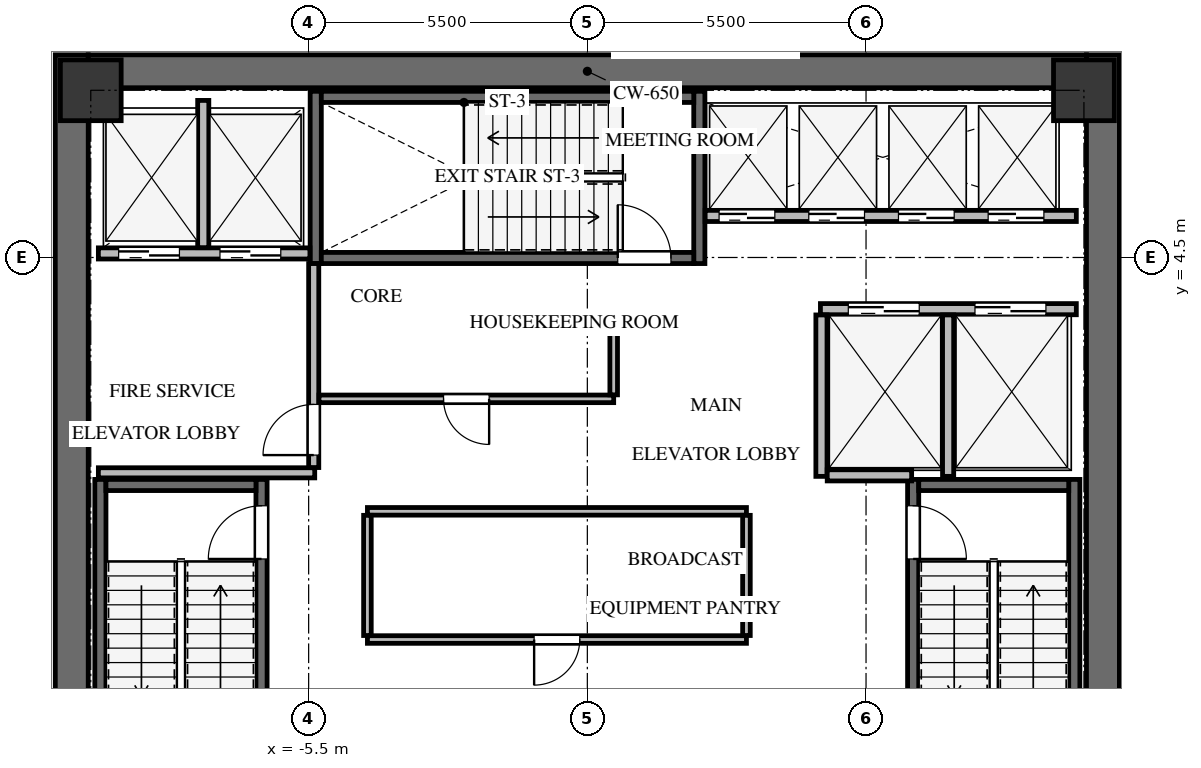
"""IFC4 building model, lengths in metres.
Left out: names, types, materials, properties, quantities, classifications, styles, units other than length and angle.
Written with IfcOpenShell. Run it as: python <this file> out.ifc"""

import sys

from ifc_helpers import new_model, si_unit, direction, frame, frame_2d, origin, origin_2d, place, context, subcontext, project, spatial, rectangle, extrude, source, transform, mapped, element, fill, save


model = new_model("IFC4")
c1 = context("Model", 3, precision=1e-05, world=origin(), true_north=direction((0.0, 1.0)))
c2 = subcontext(c1, "Body", "Model", "MODEL_VIEW")
j1 = project(units=[si_unit("LENGTHUNIT", "METRE"), si_unit("PLANEANGLEUNIT", "RADIAN")], contexts=[c1])
p1 = place(None, origin())
s1 = spatial("IfcSite", under=j1, at=p1, CompositionType="ELEMENT")
p2 = place(p1, origin())
s2 = spatial("IfcBuilding", under=s1, at=p2, CompositionType="ELEMENT")
p3 = place(p2, frame((0.0, 0.0, 209.2)))
s3 = spatial("IfcBuildingStorey", under=s2, at=p3, CompositionType="ELEMENT", Elevation=209.2)
for number, where, z_axis, x_axis in (
    (1, (-10.175, -8.5, 0.0), (0.0, 0.0, 1.0), (0.0, 1.0, 0.0)),
    (2, (10.175, -8.5, 0.0), (0.0, 0.0, 1.0), (0.0, 1.0, 0.0)),
):
    element("IfcWall", number, at=place(p3, frame(where, z_axis=z_axis, x_axis=x_axis)), inside=s3, PredefinedType="SHEAR", context=c2, shape_type="SweptSolid", body=[
        extrude(rectangle(XDim=17.0, YDim=0.65, at=frame_2d((8.5, 0.0))), origin(), (0.0, 0.0, 1.0), 4.2),
    ])
p4 = place(p3, frame((-9.85, 8.175, 0.0), z_axis=(0.0, 0.0, 1.0), x_axis=(1.0, 0.0, 0.0)))
e3 = element("IfcWall", 3, at=p4, inside=s3, PredefinedType="SHEAR", context=c2, shape_type="SweptSolid", body=[
    extrude(rectangle(XDim=19.7, YDim=0.65, at=frame_2d((9.85, 0.0))), origin(), (0.0, 0.0, 1.0), 4.2),
])
p5 = place(p3, frame((-6.43, -7.77, -0.24), z_axis=(0.0, 0.0, 1.0), x_axis=(0.0, 1.0, 0.0)))
e4 = element("IfcWall", 4, at=p5, inside=s3, PredefinedType="SHEAR", context=c2, shape_type="SweptSolid", body=[
    extrude(rectangle(XDim=7.89, YDim=0.22, at=frame_2d((3.945, 0.0))), origin(), (0.0, 0.0, 1.0), 4.14),
])
p6 = place(p5, frame((6.32, 0.0, 0.0)))
e5 = element("IfcOpeningElement", 5, at=p6, cuts=e4, PredefinedType="OPENING", context=c2, shape_type="SweptSolid", body=[
    extrude(rectangle(XDim=1.05, YDim=2.15, at=frame_2d((0.525, 1.075))), frame((0.0, 0.12, 0.0), z_axis=(0.0, -1.0, 0.0), x_axis=(1.0, 0.0, 0.0)), (0.0, 0.0, 1.0), 0.24),
])
p7 = place(p3, frame((-9.61, 0.12, -0.24), z_axis=(0.0, 0.0, 1.0), x_axis=(0.0, -1.0, 0.0)))
e6 = element("IfcWall", 6, at=p7, inside=s3, PredefinedType="SHEAR", context=c2, shape_type="SweptSolid", body=[
    extrude(rectangle(XDim=7.89, YDim=0.22, at=frame_2d((3.945, 0.0))), origin(), (0.0, 0.0, 1.0), 4.14),
])
p8 = place(p3, frame((-6.54, 0.01, -0.24), z_axis=(0.0, 0.0, 1.0), x_axis=(-1.0, 0.0, 0.0)))
e7 = element("IfcWall", 7, at=p8, inside=s3, PredefinedType="SHEAR", context=c2, shape_type="SweptSolid", body=[
    extrude(rectangle(XDim=2.96, YDim=0.22, at=frame_2d((1.48, 0.0))), origin(), (0.0, 0.0, 1.0), 4.14),
])
p9 = place(p3, frame((9.61, -7.77, -0.24), z_axis=(0.0, 0.0, 1.0), x_axis=(0.0, 1.0, 0.0)))
e8 = element("IfcWall", 8, at=p9, inside=s3, PredefinedType="SHEAR", context=c2, shape_type="SweptSolid", body=[
    extrude(rectangle(XDim=7.89, YDim=0.22, at=frame_2d((3.945, 0.0))), origin(), (0.0, 0.0, 1.0), 4.14),
])
p10 = place(p3, frame((6.43, 0.12, -0.24), z_axis=(0.0, 0.0, 1.0), x_axis=(0.0, -1.0, 0.0)))
e9 = element("IfcWall", 9, at=p10, inside=s3, PredefinedType="SHEAR", context=c2, shape_type="SweptSolid", body=[
    extrude(rectangle(XDim=7.89, YDim=0.22, at=frame_2d((3.945, 0.0))), origin(), (0.0, 0.0, 1.0), 4.14),
])
p11 = place(p10, frame((0.52, 0.0, 0.0)))
e10 = element("IfcOpeningElement", 10, at=p11, cuts=e9, PredefinedType="OPENING", context=c2, shape_type="SweptSolid", body=[
    extrude(rectangle(XDim=1.05, YDim=2.15, at=frame_2d((0.525, 1.075))), frame((0.0, 0.12, 0.0), z_axis=(0.0, -1.0, 0.0), x_axis=(1.0, 0.0, 0.0)), (0.0, 0.0, 1.0), 0.24),
])
p12 = place(p3, frame((9.5, 0.01, -0.24), z_axis=(0.0, 0.0, 1.0), x_axis=(-1.0, 0.0, 0.0)))
e11 = element("IfcWall", 11, at=p12, inside=s3, PredefinedType="SHEAR", context=c2, shape_type="SweptSolid", body=[
    extrude(rectangle(XDim=2.96, YDim=0.22, at=frame_2d((1.48, 0.0))), origin(), (0.0, 0.0, 1.0), 4.14),
])
for number, where, z_axis, x_axis in (
    (12, (2.21, 4.38, -0.24), (0.0, 0.0, 1.0), (0.0, 1.0, 0.0)),
    (13, (-5.36, 7.78, -0.24), (0.0, 0.0, 1.0), (0.0, -1.0, 0.0)),
):
    element("IfcWall", number, at=place(p3, frame(where, z_axis=z_axis, x_axis=x_axis)), inside=s3, PredefinedType="SHEAR", context=c2, shape_type="SweptSolid", body=[
        extrude(rectangle(XDim=3.4, YDim=0.22, at=frame_2d((1.7, 0.0))), origin(), (0.0, 0.0, 1.0), 4.14),
    ])
p13 = place(p3, frame((-5.25, 4.49, -0.24), z_axis=(0.0, 0.0, 1.0), x_axis=(1.0, 0.0, 0.0)))
e14 = element("IfcWall", 14, at=p13, inside=s3, PredefinedType="SHEAR", context=c2, shape_type="SweptSolid", body=[
    extrude(rectangle(XDim=7.35, YDim=0.22, at=frame_2d((3.675, 0.0))), origin(), (0.0, 0.0, 1.0), 4.14),
])
p14 = place(p13, frame((5.85, 0.0, 0.0)))
e15 = element("IfcOpeningElement", 15, at=p14, cuts=e14, PredefinedType="OPENING", context=c2, shape_type="SweptSolid", body=[
    extrude(rectangle(XDim=1.05, YDim=2.15, at=frame_2d((0.525, 1.075))), frame((0.0, 0.12, 0.0), z_axis=(0.0, -1.0, 0.0), x_axis=(1.0, 0.0, 0.0)), (0.0, 0.0, 1.0), 0.24),
])
p15 = place(p3, frame((2.1, 7.67, -0.24), z_axis=(0.0, 0.0, 1.0), x_axis=(-1.0, 0.0, 0.0)))
e16 = element("IfcWall", 16, at=p15, inside=s3, PredefinedType="SHEAR", context=c2, shape_type="SweptSolid", body=[
    extrude(rectangle(XDim=7.35, YDim=0.22, at=frame_2d((3.675, 0.0))), origin(), (0.0, 0.0, 1.0), 4.14),
])
m1 = source(origin(), c2, "Body", "SweptSolid", [
    extrude(rectangle(XDim=1.2, YDim=1.2, at=origin_2d()), origin(), (0.0, 0.0, 1.0), 4.14),
])
for number, where, z_axis, x_axis in (
    (17, (9.8, 7.8, -0.24), (0.0, 0.0, 1.0), (1.0, 0.0, 0.0)),
    (18, (-9.8, 7.8, -0.24), (0.0, 0.0, 1.0), (1.0, 0.0, 0.0)),
):
    element("IfcColumn", number, at=place(p3, frame(where, z_axis=z_axis, x_axis=x_axis)), inside=s3, PredefinedType="COLUMN", context=c2, shape_type="MappedRepresentation", body=[
        mapped(m1, transform((0.0, 0.0, 0.0), x_axis=(1.0, 0.0, 0.0), y_axis=(0.0, 1.0, 0.0), z_axis=(0.0, 0.0, 1.0), scale=1.0)),
    ])
p16 = place(p3, frame((-9.65, 4.58, 0.0), z_axis=(0.0, 0.0, 1.0), x_axis=(1.0, 0.0, 0.0)))
e19 = element("IfcWall", 19, at=p16, inside=s3, PredefinedType="SOLIDWALL", context=c2, shape_type="SweptSolid", body=[
    extrude(rectangle(XDim=4.175, YDim=0.22, at=frame_2d((2.087, 0.0))), origin(), (0.0, 0.0, 1.0), 3.885),
])
p17 = place(p16, frame((0.4, 0.0, 0.0)))
e20 = element("IfcOpeningElement", 20, at=p17, cuts=e19, PredefinedType="OPENING", context=c2, shape_type="SweptSolid", body=[
    extrude(rectangle(XDim=1.2, YDim=2.15, at=frame_2d((0.6, 1.075))), frame((0.0, 0.12, 0.0), z_axis=(0.0, -1.0, 0.0), x_axis=(1.0, 0.0, 0.0)), (0.0, 0.0, 1.0), 0.24),
])
p18 = place(p16, frame((2.4, 0.0, 0.0)))
e21 = element("IfcOpeningElement", 21, at=p18, cuts=e19, PredefinedType="OPENING", context=c2, shape_type="SweptSolid", body=[
    extrude(rectangle(XDim=1.2, YDim=2.15, at=frame_2d((0.6, 1.075))), frame((0.0, 0.12, 0.0), z_axis=(0.0, -1.0, 0.0), x_axis=(1.0, 0.0, 0.0)), (0.0, 0.0, 1.0), 0.24),
])
p19 = place(p3, frame((-7.58, 4.694, 0.0), z_axis=(0.0, 0.0, 1.0), x_axis=(0.0, 1.0, 0.0)))
e22 = element("IfcWall", 22, at=p19, inside=s3, PredefinedType="SOLIDWALL", context=c2, shape_type="SweptSolid", body=[
    extrude(rectangle(XDim=2.906, YDim=0.22, at=frame_2d((1.453, 0.0))), origin(), (0.0, 0.0, 1.0), 3.885),
])
p20 = place(p3, frame((-9.65, 0.25, 0.0), z_axis=(0.0, 0.0, 1.0), x_axis=(1.0, 0.0, 0.0)))
e23 = element("IfcWall", 23, at=p20, inside=s3, PredefinedType="SOLIDWALL", context=c2, shape_type="SweptSolid", body=[
    extrude(rectangle(XDim=4.27, YDim=0.2, at=frame_2d((2.135, 0.0))), origin(), (0.0, 0.0, 1.0), 3.885),
])
p21 = place(p3, frame((-5.4, 0.354, 0.0), z_axis=(0.0, 0.0, 1.0), x_axis=(0.0, 1.0, 0.0)))
e24 = element("IfcWall", 24, at=p21, inside=s3, PredefinedType="SOLIDWALL", context=c2, shape_type="SweptSolid", body=[
    extrude(rectangle(XDim=4.026, YDim=0.2, at=frame_2d((2.013, 0.0))), origin(), (0.0, 0.0, 1.0), 3.885),
])
p22 = place(p21, frame((0.246, 0.0, 0.0)))
e25 = element("IfcOpeningElement", 25, at=p22, cuts=e24, PredefinedType="OPENING", context=c2, shape_type="SweptSolid", body=[
    extrude(rectangle(XDim=1.0, YDim=2.15, at=frame_2d((0.5, 1.075))), frame((0.0, 0.11, 0.0), z_axis=(0.0, -1.0, 0.0), x_axis=(1.0, 0.0, 0.0)), (0.0, 0.0, 1.0), 0.22),
])
p23 = place(p3, frame((4.6, 3.48, 0.0), z_axis=(0.0, 0.0, 1.0), x_axis=(1.0, 0.0, 0.0)))
e26 = element("IfcWall", 26, at=p23, inside=s3, PredefinedType="SOLIDWALL", context=c2, shape_type="SweptSolid", body=[
    extrude(rectangle(XDim=5.05, YDim=0.22, at=frame_2d((2.525, 0.0))), origin(), (0.0, 0.0, 1.0), 3.885),
])
p24 = place(p23, frame((0.55, 0.0, 0.0)))
e27 = element("IfcOpeningElement", 27, at=p24, cuts=e26, PredefinedType="OPENING", context=c2, shape_type="SweptSolid", body=[
    extrude(rectangle(XDim=1.4, YDim=2.15, at=frame_2d((0.7, 1.075))), frame((0.0, 0.12, 0.0), z_axis=(0.0, -1.0, 0.0), x_axis=(1.0, 0.0, 0.0)), (0.0, 0.0, 1.0), 0.24),
])
p25 = place(p23, frame((3.05, 0.0, 0.0)))
e28 = element("IfcOpeningElement", 28, at=p25, cuts=e26, PredefinedType="OPENING", context=c2, shape_type="SweptSolid", body=[
    extrude(rectangle(XDim=1.4, YDim=2.15, at=frame_2d((0.7, 1.075))), frame((0.0, 0.12, 0.0), z_axis=(0.0, -1.0, 0.0), x_axis=(1.0, 0.0, 0.0)), (0.0, 0.0, 1.0), 0.24),
])
for number, where, z_axis, x_axis in (
    (29, (4.62, 0.18, 0.0), (0.0, 0.0, 1.0), (0.0, 1.0, 0.0)),
    (30, (7.12, 0.18, 0.0), (0.0, 0.0, 1.0), (0.0, 1.0, 0.0)),
):
    element("IfcWall", number, at=place(p3, frame(where, z_axis=z_axis, x_axis=x_axis)), inside=s3, PredefinedType="SOLIDWALL", context=c2, shape_type="SweptSolid", body=[
        extrude(rectangle(XDim=3.186, YDim=0.22, at=frame_2d((1.593, 0.0))), origin(), (0.0, 0.0, 1.0), 3.885),
    ])
p26 = place(p3, frame((4.734, 0.2, 0.0), z_axis=(0.0, 0.0, 1.0), x_axis=(1.0, 0.0, 0.0)))
e31 = element("IfcWall", 31, at=p26, inside=s3, PredefinedType="SOLIDWALL", context=c2, shape_type="SweptSolid", body=[
    extrude(rectangle(XDim=1.666, YDim=0.22, at=frame_2d((0.833, 0.0))), origin(), (0.0, 0.0, 1.0), 3.885),
])
p27 = place(p3, frame((2.325, 5.32, 0.0), z_axis=(0.0, 0.0, 1.0), x_axis=(1.0, 0.0, 0.0)))
e32 = element("IfcWall", 32, at=p27, inside=s3, PredefinedType="SOLIDWALL", context=c2, shape_type="SweptSolid", body=[
    extrude(rectangle(XDim=7.325, YDim=0.22, at=frame_2d((3.663, 0.0))), origin(), (0.0, 0.0, 1.0), 3.885),
])
p28 = place(p27, frame((0.275, 0.0, 0.0)))
e33 = element("IfcOpeningElement", 33, at=p28, cuts=e32, PredefinedType="OPENING", context=c2, shape_type="SweptSolid", body=[
    extrude(rectangle(XDim=1.1, YDim=2.15, at=frame_2d((0.55, 1.075))), frame((0.0, 0.12, 0.0), z_axis=(0.0, -1.0, 0.0), x_axis=(1.0, 0.0, 0.0)), (0.0, 0.0, 1.0), 0.24),
])
p29 = place(p27, frame((2.045, 0.0, 0.0)))
e34 = element("IfcOpeningElement", 34, at=p29, cuts=e32, PredefinedType="OPENING", context=c2, shape_type="SweptSolid", body=[
    extrude(rectangle(XDim=1.1, YDim=2.15, at=frame_2d((0.55, 1.075))), frame((0.0, 0.12, 0.0), z_axis=(0.0, -1.0, 0.0), x_axis=(1.0, 0.0, 0.0)), (0.0, 0.0, 1.0), 0.24),
])
p30 = place(p27, frame((3.815, 0.0, 0.0)))
e35 = element("IfcOpeningElement", 35, at=p30, cuts=e32, PredefinedType="OPENING", context=c2, shape_type="SweptSolid", body=[
    extrude(rectangle(XDim=1.1, YDim=2.15, at=frame_2d((0.55, 1.075))), frame((0.0, 0.12, 0.0), z_axis=(0.0, -1.0, 0.0), x_axis=(1.0, 0.0, 0.0)), (0.0, 0.0, 1.0), 0.24),
])
p31 = place(p27, frame((5.585, 0.0, 0.0)))
e36 = element("IfcOpeningElement", 36, at=p31, cuts=e32, PredefinedType="OPENING", context=c2, shape_type="SweptSolid", body=[
    extrude(rectangle(XDim=1.1, YDim=2.15, at=frame_2d((0.55, 1.075))), frame((0.0, 0.12, 0.0), z_axis=(0.0, -1.0, 0.0), x_axis=(1.0, 0.0, 0.0)), (0.0, 0.0, 1.0), 0.24),
])
p32 = place(p3, frame((3.14, -3.04, 0.0), z_axis=(0.0, 0.0, 1.0), x_axis=(-1.0, 0.0, 0.0)))
e37 = element("IfcWall", 37, at=p32, inside=s3, PredefinedType="PARTITIONING", context=c2, shape_type="SweptSolid", body=[
    extrude(rectangle(XDim=7.48, YDim=0.15, at=frame_2d((3.74, 0.0))), origin(), (0.0, 0.0, 1.0), 3.885),
])
p33 = place(p32, frame((3.29, 0.0, 0.0)))
e38 = element("IfcOpeningElement", 38, at=p33, cuts=e37, PredefinedType="OPENING", context=c2, shape_type="SweptSolid", body=[
    extrude(rectangle(XDim=0.9, YDim=2.05, at=frame_2d((0.45, 1.025))), frame((0.0, 0.085, 0.0), z_axis=(0.0, -1.0, 0.0), x_axis=(1.0, 0.0, 0.0)), (0.0, 0.0, 1.0), 0.17),
])
p34 = place(p3, frame((-4.34, -0.51, 0.0), z_axis=(0.0, 0.0, 1.0), x_axis=(1.0, 0.0, 0.0)))
e39 = element("IfcWall", 39, at=p34, inside=s3, PredefinedType="PARTITIONING", context=c2, shape_type="SweptSolid", body=[
    extrude(rectangle(XDim=7.48, YDim=0.15, at=frame_2d((3.74, 0.0))), origin(), (0.0, 0.0, 1.0), 3.885),
])
for number, where, z_axis, x_axis in (
    (40, (-4.34, -2.961, 0.0), (0.0, 0.0, 1.0), (0.0, 1.0, 0.0)),
    (41, (3.14, -0.589, 0.0), (0.0, 0.0, 1.0), (0.0, -1.0, 0.0)),
):
    element("IfcWall", number, at=place(p3, frame(where, z_axis=z_axis, x_axis=x_axis)), inside=s3, PredefinedType="PARTITIONING", context=c2, shape_type="SweptSolid", body=[
        extrude(rectangle(XDim=2.372, YDim=0.15, at=frame_2d((1.186, 0.0))), origin(), (0.0, 0.0, 1.0), 3.885),
    ])
p35 = place(p3, frame((0.52, 1.71, 0.0), z_axis=(0.0, 0.0, 1.0), x_axis=(-1.0, 0.0, 0.0)))
e42 = element("IfcWall", 42, at=p35, inside=s3, PredefinedType="PARTITIONING", context=c2, shape_type="SweptSolid", body=[
    extrude(rectangle(XDim=5.816, YDim=0.15, at=frame_2d((2.908, 0.0))), origin(), (0.0, 0.0, 1.0), 3.885),
])
p36 = place(p35, frame((2.458, 0.0, 0.0)))
e43 = element("IfcOpeningElement", 43, at=p36, cuts=e42, PredefinedType="OPENING", context=c2, shape_type="SweptSolid", body=[
    extrude(rectangle(XDim=0.9, YDim=2.05, at=frame_2d((0.45, 1.025))), frame((0.0, 0.085, 0.0), z_axis=(0.0, -1.0, 0.0), x_axis=(1.0, 0.0, 0.0)), (0.0, 0.0, 1.0), 0.17),
])
p37 = place(p3, frame((0.52, 3.3, 0.0), z_axis=(0.0, 0.0, 1.0), x_axis=(0.0, -1.0, 0.0)))
e44 = element("IfcWall", 44, at=p37, inside=s3, PredefinedType="PARTITIONING", context=c2, shape_type="SweptSolid", body=[
    extrude(rectangle(XDim=1.511, YDim=0.15, at=frame_2d((0.755, 0.0))), origin(), (0.0, 0.0, 1.0), 3.885),
])
m2 = source(origin(), c2, "Body", "SweptSolid", [
    extrude(rectangle(XDim=1.05, YDim=2.15, at=frame_2d((0.525, 1.075))), frame((0.0, 0.025, 0.0), z_axis=(0.0, -1.0, 0.0), x_axis=(1.0, 0.0, 0.0)), (0.0, 0.0, 1.0), 0.05),
])
p38 = place(p6, origin())
e45 = element("IfcDoor", 45, at=p38, inside=s3, OperationType="SINGLE_SWING_LEFT", PredefinedType="DOOR", context=c2, shape_type="MappedRepresentation", body=[
    mapped(m2, transform((0.0, 0.0, 0.0), x_axis=(1.0, 0.0, 0.0), y_axis=(0.0, 1.0, 0.0), z_axis=(0.0, 0.0, 1.0), scale=1.0)),
])
fill(e5, e45)
m3 = source(origin(), c2, "Body", "SweptSolid", [
    extrude(rectangle(XDim=1.05, YDim=2.15, at=frame_2d((0.525, 1.075))), frame((0.0, 0.025, 0.0), z_axis=(0.0, -1.0, 0.0), x_axis=(1.0, 0.0, 0.0)), (0.0, 0.0, 1.0), 0.05),
])
p39 = place(p11, origin())
e46 = element("IfcDoor", 46, at=p39, inside=s3, OperationType="SINGLE_SWING_RIGHT", PredefinedType="DOOR", context=c2, shape_type="MappedRepresentation", body=[
    mapped(m3, transform((0.0, 0.0, 0.0), x_axis=(1.0, 0.0, 0.0), y_axis=(0.0, 1.0, 0.0), z_axis=(0.0, 0.0, 1.0), scale=1.0)),
])
fill(e10, e46)
p40 = place(p14, origin())
e47 = element("IfcDoor", 47, at=p40, inside=s3, OperationType="SINGLE_SWING_LEFT", PredefinedType="DOOR", context=c2, shape_type="MappedRepresentation", body=[
    mapped(m2, transform((0.0, 0.0, 0.0), x_axis=(1.0, 0.0, 0.0), y_axis=(0.0, 1.0, 0.0), z_axis=(0.0, 0.0, 1.0), scale=1.0)),
])
fill(e15, e47)
m4 = source(origin(), c2, "Body", "SweptSolid", [
    extrude(rectangle(XDim=1.2, YDim=2.15, at=frame_2d((0.6, 1.075))), frame((0.0, 0.025, 0.0), z_axis=(0.0, -1.0, 0.0), x_axis=(1.0, 0.0, 0.0)), (0.0, 0.0, 1.0), 0.05),
])
p41 = place(p17, origin())
e48 = element("IfcDoor", 48, at=p41, inside=s3, OperationType="DOUBLE_DOOR_SLIDING", PredefinedType="DOOR", context=c2, shape_type="MappedRepresentation", body=[
    mapped(m4, transform((0.0, 0.0, 0.0), x_axis=(1.0, 0.0, 0.0), y_axis=(0.0, 1.0, 0.0), z_axis=(0.0, 0.0, 1.0), scale=1.0)),
])
fill(e20, e48)
p42 = place(p18, origin())
e49 = element("IfcDoor", 49, at=p42, inside=s3, OperationType="DOUBLE_DOOR_SLIDING", PredefinedType="DOOR", context=c2, shape_type="MappedRepresentation", body=[
    mapped(m4, transform((0.0, 0.0, 0.0), x_axis=(1.0, 0.0, 0.0), y_axis=(0.0, 1.0, 0.0), z_axis=(0.0, 0.0, 1.0), scale=1.0)),
])
fill(e21, e49)
m5 = source(origin(), c2, "Body", "SweptSolid", [
    extrude(rectangle(XDim=1.0, YDim=2.15, at=frame_2d((0.5, 1.075))), frame((0.0, 0.025, 0.0), z_axis=(0.0, -1.0, 0.0), x_axis=(1.0, 0.0, 0.0)), (0.0, 0.0, 1.0), 0.05),
])
p43 = place(p22, origin())
e50 = element("IfcDoor", 50, at=p43, inside=s3, OperationType="SINGLE_SWING_LEFT", PredefinedType="DOOR", context=c2, shape_type="MappedRepresentation", body=[
    mapped(m5, transform((0.0, 0.0, 0.0), x_axis=(1.0, 0.0, 0.0), y_axis=(0.0, 1.0, 0.0), z_axis=(0.0, 0.0, 1.0), scale=1.0)),
])
fill(e25, e50)
m6 = source(origin(), c2, "Body", "SweptSolid", [
    extrude(rectangle(XDim=1.4, YDim=2.15, at=frame_2d((0.7, 1.075))), frame((0.0, 0.025, 0.0), z_axis=(0.0, -1.0, 0.0), x_axis=(1.0, 0.0, 0.0)), (0.0, 0.0, 1.0), 0.05),
])
p44 = place(p24, origin())
e51 = element("IfcDoor", 51, at=p44, inside=s3, OperationType="DOUBLE_DOOR_SLIDING", PredefinedType="DOOR", context=c2, shape_type="MappedRepresentation", body=[
    mapped(m6, transform((0.0, 0.0, 0.0), x_axis=(1.0, 0.0, 0.0), y_axis=(0.0, 1.0, 0.0), z_axis=(0.0, 0.0, 1.0), scale=1.0)),
])
fill(e27, e51)
p45 = place(p25, origin())
e52 = element("IfcDoor", 52, at=p45, inside=s3, OperationType="DOUBLE_DOOR_SLIDING", PredefinedType="DOOR", context=c2, shape_type="MappedRepresentation", body=[
    mapped(m6, transform((0.0, 0.0, 0.0), x_axis=(1.0, 0.0, 0.0), y_axis=(0.0, 1.0, 0.0), z_axis=(0.0, 0.0, 1.0), scale=1.0)),
])
fill(e28, e52)
m7 = source(origin(), c2, "Body", "SweptSolid", [
    extrude(rectangle(XDim=1.1, YDim=2.15, at=frame_2d((0.55, 1.075))), frame((0.0, 0.025, 0.0), z_axis=(0.0, -1.0, 0.0), x_axis=(1.0, 0.0, 0.0)), (0.0, 0.0, 1.0), 0.05),
])
p46 = place(p28, origin())
e53 = element("IfcDoor", 53, at=p46, inside=s3, OperationType="DOUBLE_DOOR_SLIDING", PredefinedType="DOOR", context=c2, shape_type="MappedRepresentation", body=[
    mapped(m7, transform((0.0, 0.0, 0.0), x_axis=(1.0, 0.0, 0.0), y_axis=(0.0, 1.0, 0.0), z_axis=(0.0, 0.0, 1.0), scale=1.0)),
])
fill(e33, e53)
p47 = place(p29, origin())
e54 = element("IfcDoor", 54, at=p47, inside=s3, OperationType="DOUBLE_DOOR_SLIDING", PredefinedType="DOOR", context=c2, shape_type="MappedRepresentation", body=[
    mapped(m7, transform((0.0, 0.0, 0.0), x_axis=(1.0, 0.0, 0.0), y_axis=(0.0, 1.0, 0.0), z_axis=(0.0, 0.0, 1.0), scale=1.0)),
])
fill(e34, e54)
p48 = place(p30, origin())
e55 = element("IfcDoor", 55, at=p48, inside=s3, OperationType="DOUBLE_DOOR_SLIDING", PredefinedType="DOOR", context=c2, shape_type="MappedRepresentation", body=[
    mapped(m7, transform((0.0, 0.0, 0.0), x_axis=(1.0, 0.0, 0.0), y_axis=(0.0, 1.0, 0.0), z_axis=(0.0, 0.0, 1.0), scale=1.0)),
])
fill(e35, e55)
p49 = place(p31, origin())
e56 = element("IfcDoor", 56, at=p49, inside=s3, OperationType="DOUBLE_DOOR_SLIDING", PredefinedType="DOOR", context=c2, shape_type="MappedRepresentation", body=[
    mapped(m7, transform((0.0, 0.0, 0.0), x_axis=(1.0, 0.0, 0.0), y_axis=(0.0, 1.0, 0.0), z_axis=(0.0, 0.0, 1.0), scale=1.0)),
])
fill(e36, e56)
m8 = source(origin(), c2, "Body", "SweptSolid", [
    extrude(rectangle(XDim=0.9, YDim=2.05, at=frame_2d((0.45, 1.025))), frame((0.0, 0.025, 0.0), z_axis=(0.0, -1.0, 0.0), x_axis=(1.0, 0.0, 0.0)), (0.0, 0.0, 1.0), 0.05),
])
p50 = place(p33, origin())
e57 = element("IfcDoor", 57, at=p50, inside=s3, OperationType="SINGLE_SWING_RIGHT", PredefinedType="DOOR", context=c2, shape_type="MappedRepresentation", body=[
    mapped(m8, transform((0.0, 0.0, 0.0), x_axis=(1.0, 0.0, 0.0), y_axis=(0.0, 1.0, 0.0), z_axis=(0.0, 0.0, 1.0), scale=1.0)),
])
fill(e38, e57)
m9 = source(origin(), c2, "Body", "SweptSolid", [
    extrude(rectangle(XDim=0.9, YDim=2.05, at=frame_2d((0.45, 1.025))), frame((0.0, 0.025, 0.0), z_axis=(0.0, -1.0, 0.0), x_axis=(1.0, 0.0, 0.0)), (0.0, 0.0, 1.0), 0.05),
])
p51 = place(p36, origin())
e58 = element("IfcDoor", 58, at=p51, inside=s3, OperationType="SINGLE_SWING_LEFT", PredefinedType="DOOR", context=c2, shape_type="MappedRepresentation", body=[
    mapped(m9, transform((0.0, 0.0, 0.0), x_axis=(1.0, 0.0, 0.0), y_axis=(0.0, 1.0, 0.0), z_axis=(0.0, 0.0, 1.0), scale=1.0)),
])
fill(e43, e58)
save(model, sys.argv[1])
